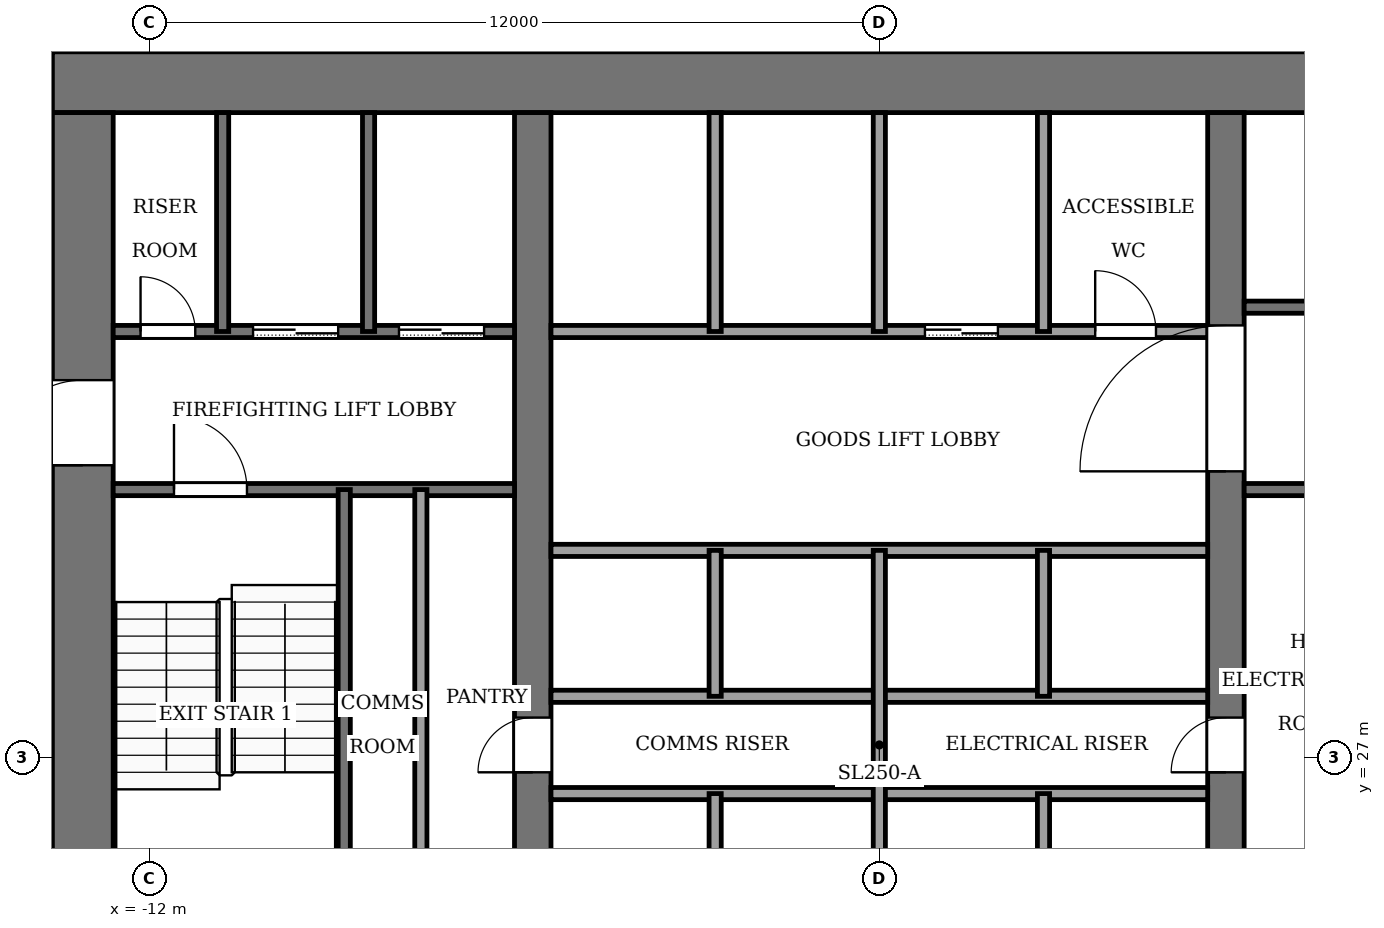
"""IFC4 building model, lengths in metres.
Left out: names, types, materials, properties, quantities, classifications, styles, units other than length and angle.
Written with IfcOpenShell. Run it as: python <this file> out.ifc"""

import sys

from ifc_helpers import new_model, si_unit, direction, frame, frame_2d, origin, place, context, subcontext, project, spatial, rectangle, extrude, element, fill, save


model = new_model("IFC4")
c1 = context("Model", 3, precision=1e-05, world=origin(), true_north=direction((0.0, 1.0)))
c2 = subcontext(c1, "Body", "Model", "MODEL_VIEW")
j1 = project(units=[si_unit("LENGTHUNIT", "METRE"), si_unit("PLANEANGLEUNIT", "RADIAN")], contexts=[c1])
p1 = place(None, origin())
s1 = spatial("IfcSite", under=j1, at=p1, CompositionType="ELEMENT")
p2 = place(p1, origin())
s2 = spatial("IfcBuilding", under=s1, at=p2, CompositionType="ELEMENT")
p3 = place(p2, frame((0.0, 0.0, 130.0)))
s3 = spatial("IfcBuildingStorey", under=s2, at=p3, CompositionType="ELEMENT", Elevation=130.0)
p4 = place(p3, frame((-13.6, 38.1, -0.13), z_axis=(0.0, 0.0, 1.0), x_axis=(1.0, 0.0, 0.0)))
e1 = element("IfcWall", 1, at=p4, inside=s3, PredefinedType="SHEAR", context=c2, shape_type="SweptSolid", body=[
    extrude(rectangle(XDim=27.2, YDim=1.0, at=frame_2d((13.6, 0.0))), origin(), (0.0, 0.0, 1.0), 4.0),
])
p5 = place(p3, frame((-13.1, 18.4, -0.13), z_axis=(0.0, 0.0, 1.0), x_axis=(0.0, 1.0, 0.0)))
e2 = element("IfcWall", 2, at=p5, inside=s3, PredefinedType="SHEAR", context=c2, shape_type="SweptSolid", body=[
    extrude(rectangle(XDim=19.2, YDim=1.0, at=frame_2d((9.6, 0.0))), origin(), (0.0, 0.0, 1.0), 4.0),
])
p6 = place(p5, frame((2.8, 0.0, 0.13)))
e3 = element("IfcOpeningElement", 3, at=p6, cuts=e2, PredefinedType="OPENING", context=c2, shape_type="SweptSolid", body=[
    extrude(rectangle(XDim=2.4, YDim=2.4, at=frame_2d((1.2, 1.2))), frame((0.0, 0.51, 0.0), z_axis=(0.0, -1.0, 0.0), x_axis=(1.0, 0.0, 0.0)), (0.0, 0.0, 1.0), 1.02),
])
p7 = place(p5, frame((13.4, 0.0, 0.13)))
e4 = element("IfcOpeningElement", 4, at=p7, cuts=e2, PredefinedType="OPENING", context=c2, shape_type="SweptSolid", body=[
    extrude(rectangle(XDim=1.4, YDim=2.2, at=frame_2d((0.7, 1.1))), frame((0.0, 0.51, 0.0), z_axis=(0.0, -1.0, 0.0), x_axis=(1.0, 0.0, 0.0)), (0.0, 0.0, 1.0), 1.02),
])
p8 = place(p3, frame((-5.7, 18.4, -0.13), z_axis=(0.0, 0.0, 1.0), x_axis=(0.0, 1.0, 0.0)))
e5 = element("IfcWall", 5, at=p8, inside=s3, PredefinedType="SHEAR", context=c2, shape_type="SweptSolid", body=[
    extrude(rectangle(XDim=19.2, YDim=0.6, at=frame_2d((9.6, 0.0))), origin(), (0.0, 0.0, 1.0), 4.0),
])
p9 = place(p8, frame((8.35, 0.0, 0.13)))
e6 = element("IfcOpeningElement", 6, at=p9, cuts=e5, PredefinedType="OPENING", context=c2, shape_type="SweptSolid", body=[
    extrude(rectangle(XDim=0.9, YDim=2.1, at=frame_2d((0.45, 1.05))), frame((0.0, 0.31, 0.0), z_axis=(0.0, -1.0, 0.0), x_axis=(1.0, 0.0, 0.0)), (0.0, 0.0, 1.0), 0.62),
])
p10 = place(p3, frame((5.7, 18.4, -0.13), z_axis=(0.0, 0.0, 1.0), x_axis=(0.0, 1.0, 0.0)))
e7 = element("IfcWall", 7, at=p10, inside=s3, PredefinedType="SHEAR", context=c2, shape_type="SweptSolid", body=[
    extrude(rectangle(XDim=19.2, YDim=0.6, at=frame_2d((9.6, 0.0))), origin(), (0.0, 0.0, 1.0), 4.0),
])
p11 = place(p10, frame((8.35, 0.0, 0.13)))
e8 = element("IfcOpeningElement", 8, at=p11, cuts=e7, PredefinedType="OPENING", context=c2, shape_type="SweptSolid", body=[
    extrude(rectangle(XDim=0.9, YDim=2.1, at=frame_2d((0.45, 1.05))), frame((0.0, 0.31, 0.0), z_axis=(0.0, -1.0, 0.0), x_axis=(1.0, 0.0, 0.0)), (0.0, 0.0, 1.0), 0.62),
])
p12 = place(p10, frame((13.3, 0.0, 0.13)))
e9 = element("IfcOpeningElement", 9, at=p12, cuts=e7, PredefinedType="OPENING", context=c2, shape_type="SweptSolid", body=[
    extrude(rectangle(XDim=2.4, YDim=2.4, at=frame_2d((1.2, 1.2))), frame((0.0, 0.31, 0.0), z_axis=(0.0, -1.0, 0.0), x_axis=(1.0, 0.0, 0.0)), (0.0, 0.0, 1.0), 0.62),
])
for number, where, z_axis, x_axis in (
    (10, (-5.4, 26.4, 0.0), (0.0, 0.0, 1.0), (1.0, 0.0, 0.0)),
    (11, (-5.4, 28.0, 0.0), (0.0, 0.0, 1.0), (1.0, 0.0, 0.0)),
    (12, (-5.4, 30.4, 0.0), (0.0, 0.0, 1.0), (1.0, 0.0, 0.0)),
):
    element("IfcWall", number, at=place(p3, frame(where, z_axis=z_axis, x_axis=x_axis)), inside=s3, PredefinedType="PARTITIONING", context=c2, shape_type="SweptSolid", body=[
        extrude(rectangle(XDim=10.8, YDim=0.2, at=frame_2d((5.4, 0.0))), origin(), (0.0, 0.0, 1.0), 3.87),
    ])
p13 = place(p3, frame((-12.6, 31.4, 0.0), z_axis=(0.0, 0.0, 1.0), x_axis=(1.0, 0.0, 0.0)))
e13 = element("IfcWall", 13, at=p13, inside=s3, PredefinedType="PARTITIONING", context=c2, shape_type="SweptSolid", body=[
    extrude(rectangle(XDim=6.6, YDim=0.2, at=frame_2d((3.3, 0.0))), origin(), (0.0, 0.0, 1.0), 3.87),
])
p14 = place(p13, frame((1.0, 0.0, 0.0)))
e14 = element("IfcOpeningElement", 14, at=p14, cuts=e13, PredefinedType="OPENING", context=c2, shape_type="SweptSolid", body=[
    extrude(rectangle(XDim=1.2, YDim=2.2, at=frame_2d((0.6, 1.1))), frame((0.0, 0.11, 0.0), z_axis=(0.0, -1.0, 0.0), x_axis=(1.0, 0.0, 0.0)), (0.0, 0.0, 1.0), 0.22),
])
p15 = place(p3, frame((6.0, 31.4, 0.0), z_axis=(0.0, 0.0, 1.0), x_axis=(1.0, 0.0, 0.0)))
e15 = element("IfcWall", 15, at=p15, inside=s3, PredefinedType="PARTITIONING", context=c2, shape_type="SweptSolid", body=[
    extrude(rectangle(XDim=6.6, YDim=0.2, at=frame_2d((3.3, 0.0))), origin(), (0.0, 0.0, 1.0), 3.87),
])
p16 = place(p3, frame((-12.6, 34.0, 0.0), z_axis=(0.0, 0.0, 1.0), x_axis=(1.0, 0.0, 0.0)))
e16 = element("IfcWall", 16, at=p16, inside=s3, PredefinedType="PARTITIONING", context=c2, shape_type="SweptSolid", body=[
    extrude(rectangle(XDim=6.6, YDim=0.2, at=frame_2d((3.3, 0.0))), origin(), (0.0, 0.0, 1.0), 3.87),
])
p17 = place(p16, frame((4.7, 0.0, 0.0)))
e17 = element("IfcOpeningElement", 17, at=p17, cuts=e16, PredefinedType="OPENING", context=c2, shape_type="SweptSolid", body=[
    extrude(rectangle(XDim=1.4, YDim=2.2, at=frame_2d((0.7, 1.1))), frame((0.0, 0.11, 0.0), z_axis=(0.0, -1.0, 0.0), x_axis=(1.0, 0.0, 0.0)), (0.0, 0.0, 1.0), 0.22),
])
p18 = place(p16, frame((2.3, 0.0, 0.0)))
e18 = element("IfcOpeningElement", 18, at=p18, cuts=e16, PredefinedType="OPENING", context=c2, shape_type="SweptSolid", body=[
    extrude(rectangle(XDim=1.4, YDim=2.2, at=frame_2d((0.7, 1.1))), frame((0.0, 0.11, 0.0), z_axis=(0.0, -1.0, 0.0), x_axis=(1.0, 0.0, 0.0)), (0.0, 0.0, 1.0), 0.22),
])
p19 = place(p16, frame((0.45, 0.0, 0.0)))
e19 = element("IfcOpeningElement", 19, at=p19, cuts=e16, PredefinedType="OPENING", context=c2, shape_type="SweptSolid", body=[
    extrude(rectangle(XDim=0.9, YDim=2.1, at=frame_2d((0.45, 1.05))), frame((0.0, 0.11, 0.0), z_axis=(0.0, -1.0, 0.0), x_axis=(1.0, 0.0, 0.0)), (0.0, 0.0, 1.0), 0.22),
])
p20 = place(p3, frame((-5.4, 34.0, 0.0), z_axis=(0.0, 0.0, 1.0), x_axis=(1.0, 0.0, 0.0)))
e20 = element("IfcWall", 20, at=p20, inside=s3, PredefinedType="PARTITIONING", context=c2, shape_type="SweptSolid", body=[
    extrude(rectangle(XDim=10.8, YDim=0.2, at=frame_2d((5.4, 0.0))), origin(), (0.0, 0.0, 1.0), 3.87),
])
p21 = place(p20, frame((6.15, 0.0, 0.0)))
e21 = element("IfcOpeningElement", 21, at=p21, cuts=e20, PredefinedType="OPENING", context=c2, shape_type="SweptSolid", body=[
    extrude(rectangle(XDim=1.2, YDim=2.2, at=frame_2d((0.6, 1.1))), frame((0.0, 0.11, 0.0), z_axis=(0.0, -1.0, 0.0), x_axis=(1.0, 0.0, 0.0)), (0.0, 0.0, 1.0), 0.22),
])
p22 = place(p20, frame((8.95, 0.0, 0.0)))
e22 = element("IfcOpeningElement", 22, at=p22, cuts=e20, PredefinedType="OPENING", context=c2, shape_type="SweptSolid", body=[
    extrude(rectangle(XDim=1.0, YDim=2.1, at=frame_2d((0.5, 1.05))), frame((0.0, 0.11, 0.0), z_axis=(0.0, -1.0, 0.0), x_axis=(1.0, 0.0, 0.0)), (0.0, 0.0, 1.0), 0.22),
])
p23 = place(p3, frame((6.0, 34.4, 0.0), z_axis=(0.0, 0.0, 1.0), x_axis=(1.0, 0.0, 0.0)))
e23 = element("IfcWall", 23, at=p23, inside=s3, PredefinedType="PARTITIONING", context=c2, shape_type="SweptSolid", body=[
    extrude(rectangle(XDim=6.6, YDim=0.2, at=frame_2d((3.3, 0.0))), origin(), (0.0, 0.0, 1.0), 3.87),
])
p24 = place(p23, frame((4.8, 0.0, 0.0)))
e24 = element("IfcOpeningElement", 24, at=p24, cuts=e23, PredefinedType="OPENING", context=c2, shape_type="SweptSolid", body=[
    extrude(rectangle(XDim=1.2, YDim=2.2, at=frame_2d((0.6, 1.1))), frame((0.0, 0.11, 0.0), z_axis=(0.0, -1.0, 0.0), x_axis=(1.0, 0.0, 0.0)), (0.0, 0.0, 1.0), 0.22),
])
p25 = place(p3, frame((-10.8, 34.0, 0.0), z_axis=(0.0, 0.0, 1.0), x_axis=(0.0, 1.0, 0.0)))
e25 = element("IfcWall", 25, at=p25, inside=s3, PredefinedType="PARTITIONING", context=c2, shape_type="SweptSolid", body=[
    extrude(rectangle(XDim=3.6, YDim=0.2, at=frame_2d((1.8, 0.0))), origin(), (0.0, 0.0, 1.0), 3.87),
])
p26 = place(p3, frame((-8.8, 24.0, 0.0), z_axis=(0.0, 0.0, 1.0), x_axis=(0.0, 1.0, 0.0)))
e26 = element("IfcWall", 26, at=p26, inside=s3, PredefinedType="PARTITIONING", context=c2, shape_type="SweptSolid", body=[
    extrude(rectangle(XDim=7.4, YDim=0.2, at=frame_2d((3.7, 0.0))), origin(), (0.0, 0.0, 1.0), 3.87),
])
p27 = place(p3, frame((-8.4, 34.0, 0.0), z_axis=(0.0, 0.0, 1.0), x_axis=(0.0, 1.0, 0.0)))
e27 = element("IfcWall", 27, at=p27, inside=s3, PredefinedType="PARTITIONING", context=c2, shape_type="SweptSolid", body=[
    extrude(rectangle(XDim=3.6, YDim=0.2, at=frame_2d((1.8, 0.0))), origin(), (0.0, 0.0, 1.0), 3.87),
])
p28 = place(p3, frame((-7.54, 24.0, 0.0), z_axis=(0.0, 0.0, 1.0), x_axis=(0.0, 1.0, 0.0)))
e28 = element("IfcWall", 28, at=p28, inside=s3, PredefinedType="PARTITIONING", context=c2, shape_type="SweptSolid", body=[
    extrude(rectangle(XDim=7.4, YDim=0.2, at=frame_2d((3.7, 0.0))), origin(), (0.0, 0.0, 1.0), 3.87),
])
for number, where, z_axis, x_axis in (
    (29, (-2.7, 24.0, 0.0), (0.0, 0.0, 1.0), (0.0, 1.0, 0.0)),
    (30, (-2.7, 28.0, 0.0), (0.0, 0.0, 1.0), (0.0, 1.0, 0.0)),
):
    element("IfcWall", number, at=place(p3, frame(where, z_axis=z_axis, x_axis=x_axis)), inside=s3, PredefinedType="PARTITIONING", context=c2, shape_type="SweptSolid", body=[
        extrude(rectangle(XDim=2.4, YDim=0.2, at=frame_2d((1.2, 0.0))), origin(), (0.0, 0.0, 1.0), 3.87),
    ])
p29 = place(p3, frame((-2.7, 34.0, 0.0), z_axis=(0.0, 0.0, 1.0), x_axis=(0.0, 1.0, 0.0)))
e31 = element("IfcWall", 31, at=p29, inside=s3, PredefinedType="PARTITIONING", context=c2, shape_type="SweptSolid", body=[
    extrude(rectangle(XDim=3.6, YDim=0.2, at=frame_2d((1.8, 0.0))), origin(), (0.0, 0.0, 1.0), 3.87),
])
p30 = place(p3, frame((0.0, 24.0, 0.0), z_axis=(0.0, 0.0, 1.0), x_axis=(0.0, 1.0, 0.0)))
e32 = element("IfcWall", 32, at=p30, inside=s3, PredefinedType="PARTITIONING", context=c2, shape_type="SweptSolid", body=[
    extrude(rectangle(XDim=6.4, YDim=0.2, at=frame_2d((3.2, 0.0))), origin(), (0.0, 0.0, 1.0), 3.87),
])
p31 = place(p3, frame((0.0, 34.0, 0.0), z_axis=(0.0, 0.0, 1.0), x_axis=(0.0, 1.0, 0.0)))
e33 = element("IfcWall", 33, at=p31, inside=s3, PredefinedType="PARTITIONING", context=c2, shape_type="SweptSolid", body=[
    extrude(rectangle(XDim=3.6, YDim=0.2, at=frame_2d((1.8, 0.0))), origin(), (0.0, 0.0, 1.0), 3.87),
])
for number, where, z_axis, x_axis in (
    (34, (2.7, 24.0, 0.0), (0.0, 0.0, 1.0), (0.0, 1.0, 0.0)),
    (35, (2.7, 28.0, 0.0), (0.0, 0.0, 1.0), (0.0, 1.0, 0.0)),
):
    element("IfcWall", number, at=place(p3, frame(where, z_axis=z_axis, x_axis=x_axis)), inside=s3, PredefinedType="PARTITIONING", context=c2, shape_type="SweptSolid", body=[
        extrude(rectangle(XDim=2.4, YDim=0.2, at=frame_2d((1.2, 0.0))), origin(), (0.0, 0.0, 1.0), 3.87),
    ])
p32 = place(p3, frame((2.7, 34.0, 0.0), z_axis=(0.0, 0.0, 1.0), x_axis=(0.0, 1.0, 0.0)))
e36 = element("IfcWall", 36, at=p32, inside=s3, PredefinedType="PARTITIONING", context=c2, shape_type="SweptSolid", body=[
    extrude(rectangle(XDim=3.6, YDim=0.2, at=frame_2d((1.8, 0.0))), origin(), (0.0, 0.0, 1.0), 3.87),
])
p33 = place(p21, origin())
e37 = element("IfcDoor", 37, at=p33, inside=s3, OperationType="SLIDING_TO_LEFT", PredefinedType="DOOR", context=c2, shape_type="SweptSolid", body=[
    extrude(rectangle(XDim=1.2, YDim=2.2, at=frame_2d((0.6, 1.1))), frame((0.0, 0.025, 0.0), z_axis=(0.0, -1.0, 0.0), x_axis=(1.0, 0.0, 0.0)), (0.0, 0.0, 1.0), 0.05),
])
fill(e21, e37)
p34 = place(p17, origin())
e38 = element("IfcDoor", 38, at=p34, inside=s3, OperationType="SLIDING_TO_LEFT", PredefinedType="DOOR", context=c2, shape_type="SweptSolid", body=[
    extrude(rectangle(XDim=1.4, YDim=2.2, at=frame_2d((0.7, 1.1))), frame((0.0, 0.025, 0.0), z_axis=(0.0, -1.0, 0.0), x_axis=(1.0, 0.0, 0.0)), (0.0, 0.0, 1.0), 0.05),
])
fill(e17, e38)
p35 = place(p18, origin())
e39 = element("IfcDoor", 39, at=p35, inside=s3, OperationType="SLIDING_TO_LEFT", PredefinedType="DOOR", context=c2, shape_type="SweptSolid", body=[
    extrude(rectangle(XDim=1.4, YDim=2.2, at=frame_2d((0.7, 1.1))), frame((0.0, 0.025, 0.0), z_axis=(0.0, -1.0, 0.0), x_axis=(1.0, 0.0, 0.0)), (0.0, 0.0, 1.0), 0.05),
])
fill(e18, e39)
p36 = place(p19, origin())
e40 = element("IfcDoor", 40, at=p36, inside=s3, OperationType="SINGLE_SWING_RIGHT", PredefinedType="DOOR", context=c2, shape_type="SweptSolid", body=[
    extrude(rectangle(XDim=0.9, YDim=2.1, at=frame_2d((0.45, 1.05))), frame((0.0, 0.025, 0.0), z_axis=(0.0, -1.0, 0.0), x_axis=(1.0, 0.0, 0.0)), (0.0, 0.0, 1.0), 0.05),
])
fill(e19, e40)
p37 = place(p22, origin())
e41 = element("IfcDoor", 41, at=p37, inside=s3, OperationType="SINGLE_SWING_LEFT", PredefinedType="DOOR", context=c2, shape_type="SweptSolid", body=[
    extrude(rectangle(XDim=1.0, YDim=2.1, at=frame_2d((0.5, 1.05))), frame((0.0, 0.025, 0.0), z_axis=(0.0, -1.0, 0.0), x_axis=(1.0, 0.0, 0.0)), (0.0, 0.0, 1.0), 0.05),
])
fill(e22, e41)
p38 = place(p9, origin())
e42 = element("IfcDoor", 42, at=p38, inside=s3, OperationType="SINGLE_SWING_RIGHT", PredefinedType="DOOR", context=c2, shape_type="SweptSolid", body=[
    extrude(rectangle(XDim=0.9, YDim=2.1, at=frame_2d((0.45, 1.05))), frame((0.0, 0.025, 0.0), z_axis=(0.0, -1.0, 0.0), x_axis=(1.0, 0.0, 0.0)), (0.0, 0.0, 1.0), 0.05),
])
fill(e6, e42)
p39 = place(p11, origin())
e43 = element("IfcDoor", 43, at=p39, inside=s3, OperationType="SINGLE_SWING_LEFT", PredefinedType="DOOR", context=c2, shape_type="SweptSolid", body=[
    extrude(rectangle(XDim=0.9, YDim=2.1, at=frame_2d((0.45, 1.05))), frame((0.0, 0.025, 0.0), z_axis=(0.0, -1.0, 0.0), x_axis=(1.0, 0.0, 0.0)), (0.0, 0.0, 1.0), 0.05),
])
fill(e8, e43)
p40 = place(p14, origin())
e44 = element("IfcDoor", 44, at=p40, inside=s3, OperationType="SINGLE_SWING_LEFT", PredefinedType="DOOR", context=c2, shape_type="SweptSolid", body=[
    extrude(rectangle(XDim=1.2, YDim=2.2, at=frame_2d((0.6, 1.1))), frame((0.0, 0.025, 0.0), z_axis=(0.0, -1.0, 0.0), x_axis=(1.0, 0.0, 0.0)), (0.0, 0.0, 1.0), 0.05),
])
fill(e14, e44)
p41 = place(p12, origin())
e45 = element("IfcDoor", 45, at=p41, inside=s3, OperationType="DOUBLE_DOOR_SINGLE_SWING", PredefinedType="DOOR", context=c2, shape_type="SweptSolid", body=[
    extrude(rectangle(XDim=2.4, YDim=2.4, at=frame_2d((1.2, 1.2))), frame((0.0, 0.025, 0.0), z_axis=(0.0, -1.0, 0.0), x_axis=(1.0, 0.0, 0.0)), (0.0, 0.0, 1.0), 0.05),
])
fill(e9, e45)
p42 = place(p7, origin())
e46 = element("IfcDoor", 46, at=p42, inside=s3, OperationType="SINGLE_SWING_LEFT", PredefinedType="DOOR", context=c2, shape_type="SweptSolid", body=[
    extrude(rectangle(XDim=1.4, YDim=2.2, at=frame_2d((0.7, 1.1))), frame((0.0, 0.025, 0.0), z_axis=(0.0, -1.0, 0.0), x_axis=(1.0, 0.0, 0.0)), (0.0, 0.0, 1.0), 0.05),
])
fill(e4, e46)
save(model, sys.argv[1])
